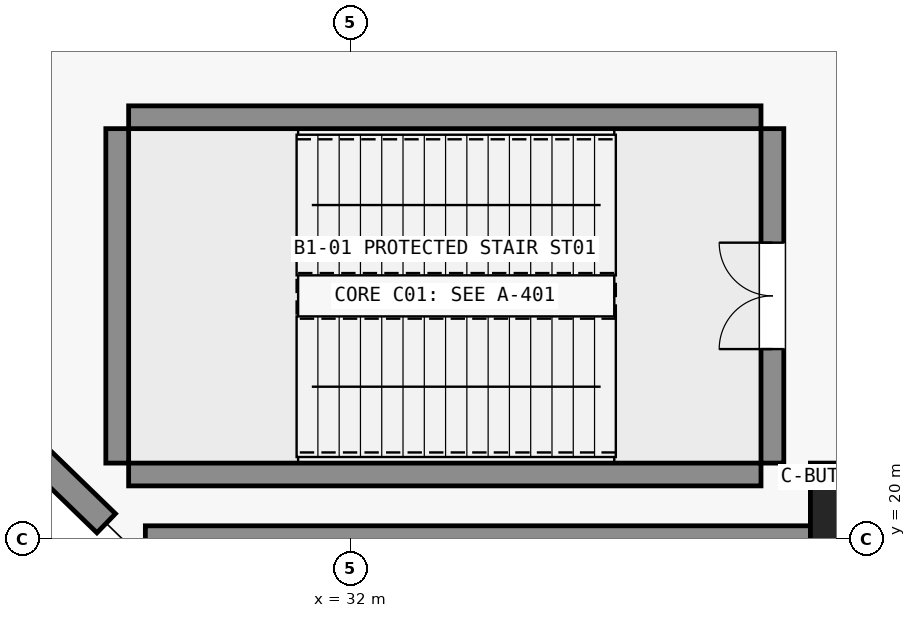
"""IFC4 building model, lengths in metres.
Left out: names, types, materials, properties, quantities, classifications, styles, units other than length and angle.
Written with IfcOpenShell. Run it as: python <this file> out.ifc"""

import sys

from ifc_helpers import new_model, si_unit, direction, frame, frame_2d, origin, origin_2d, place, context, subcontext, project, spatial, rectangle, extrude, element, fill, save


model = new_model("IFC4")
c1 = context("Model", 3, precision=1e-05, world=origin(), true_north=direction((0.0, 1.0)))
c2 = subcontext(c1, "Body", "Model", "MODEL_VIEW")
j1 = project(units=[si_unit("LENGTHUNIT", "METRE"), si_unit("PLANEANGLEUNIT", "RADIAN")], contexts=[c1])
p1 = place(None, origin())
s1 = spatial("IfcSite", under=j1, at=p1, CompositionType="ELEMENT")
p2 = place(p1, origin())
s2 = spatial("IfcBuilding", under=s1, at=p2, CompositionType="ELEMENT")
p3 = place(p2, frame((0.0, 0.0, -5.4)))
s3 = spatial("IfcBuildingStorey", under=s2, at=p3, CompositionType="ELEMENT", Elevation=-5.4)
p4 = place(p3, frame((38.5, 20.4, 0.0), z_axis=(0.0, 0.0, 1.0), x_axis=(1.0, 0.0, 0.0)))
e1 = element("IfcColumn", 1, at=p4, inside=s3, PredefinedType="PILASTER", context=c2, shape_type="SweptSolid", body=[
    extrude(rectangle(XDim=0.9, YDim=1.2, at=origin_2d()), origin(), (0.0, 0.0, 1.0), 5.4),
])
for number, where, z_axis, x_axis in (
    (2, (29.08, 20.85, 0.0), (0.0, 0.0, 1.0), (1.0, 0.0, 0.0)),
    (3, (29.08, 25.55, 0.0), (0.0, 0.0, 1.0), (1.0, 0.0, 0.0)),
):
    element("IfcWall", number, at=place(p3, frame(where, z_axis=z_axis, x_axis=x_axis)), inside=s3, PredefinedType="SHEAR", context=c2, shape_type="SweptSolid", body=[
        extrude(rectangle(XDim=8.32, YDim=0.3, at=frame_2d((4.16, 0.0))), origin(), (0.0, 0.0, 1.0), 5.4),
    ])
p5 = place(p3, frame((28.93, 21.0, 0.0), z_axis=(0.0, 0.0, 1.0), x_axis=(0.0, 1.0, 0.0)))
e4 = element("IfcWall", 4, at=p5, inside=s3, PredefinedType="SHEAR", context=c2, shape_type="SweptSolid", body=[
    extrude(rectangle(XDim=4.4, YDim=0.3, at=frame_2d((2.2, 0.0))), origin(), (0.0, 0.0, 1.0), 5.4),
])
p6 = place(p3, frame((37.55, 21.0, 0.0), z_axis=(0.0, 0.0, 1.0), x_axis=(0.0, 1.0, 0.0)))
e5 = element("IfcWall", 5, at=p6, inside=s3, PredefinedType="SHEAR", context=c2, shape_type="SweptSolid", body=[
    extrude(rectangle(XDim=4.4, YDim=0.3, at=frame_2d((2.2, 0.0))), origin(), (0.0, 0.0, 1.0), 5.4),
])
p7 = place(p6, frame((1.5, 0.0, 0.0)))
e6 = element("IfcOpeningElement", 6, at=p7, cuts=e5, PredefinedType="OPENING", context=c2, shape_type="SweptSolid", body=[
    extrude(rectangle(XDim=1.4, YDim=2.2, at=frame_2d((0.7, 1.1))), frame((0.0, 0.16, 0.0), z_axis=(0.0, -1.0, 0.0), x_axis=(1.0, 0.0, 0.0)), (0.0, 0.0, 1.0), 0.32),
])
p8 = place(p3, frame((29.3, 20.0, 0.0), z_axis=(0.0, 0.0, 1.0), x_axis=(1.0, 0.0, 0.0)))
e7 = element("IfcWall", 7, at=p8, inside=s3, PredefinedType="SOLIDWALL", context=c2, shape_type="SweptSolid", body=[
    extrude(rectangle(XDim=64.4, YDim=0.35, at=frame_2d((32.2, 0.0))), origin(), (0.0, 0.0, 1.0), 4.96),
])
p9 = place(p3, frame((16.215, 32.391, 0.0), z_axis=(0.0, 0.0, 1.0), x_axis=(0.718073787682, -0.695966978703, 0.0)))
e8 = element("IfcWall", 8, at=p9, inside=s3, PredefinedType="SOLIDWALL", context=c2, shape_type="SweptSolid", body=[
    extrude(rectangle(XDim=17.504, YDim=0.35, at=frame_2d((8.752, 0.0))), origin(), (0.0, 0.0, 1.0), 4.96),
])
p10 = place(p7, origin())
e9 = element("IfcDoor", 9, at=p10, inside=s3, OperationType="DOUBLE_DOOR_SINGLE_SWING", PredefinedType="DOOR", context=c2, shape_type="SweptSolid", body=[
    extrude(rectangle(XDim=1.4, YDim=2.2, at=frame_2d((0.7, 1.1))), frame((0.0, 0.025, 0.0), z_axis=(0.0, -1.0, 0.0), x_axis=(1.0, 0.0, 0.0)), (0.0, 0.0, 1.0), 0.05),
])
fill(e6, e9)
save(model, sys.argv[1])
